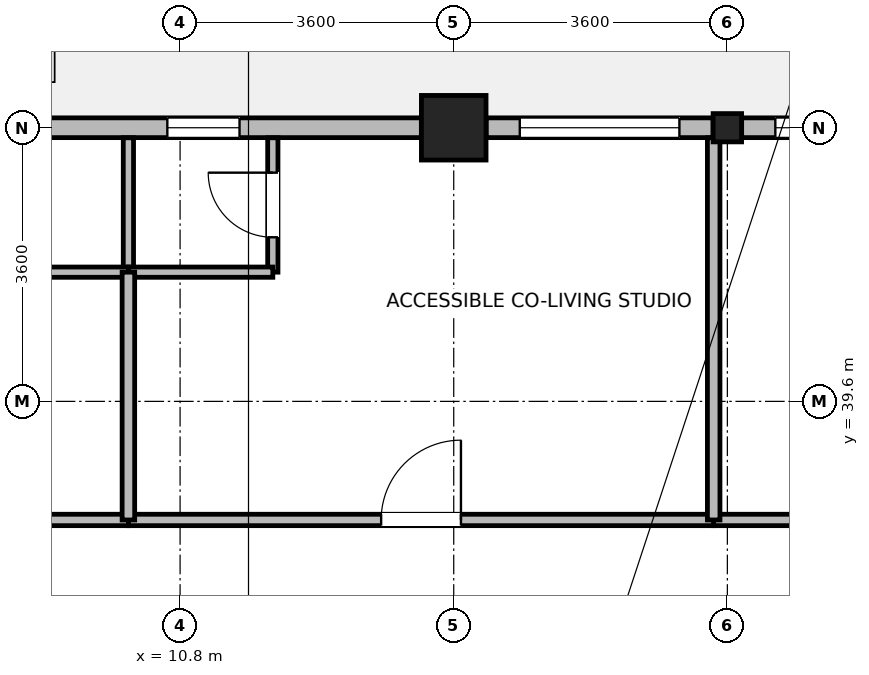
"""IFC4 building model, lengths in metres.
Left out: names, types, materials, properties, quantities, classifications, styles, units other than length and angle.
Written with IfcOpenShell. Run it as: python <this file> out.ifc"""

import sys

from ifc_helpers import new_model, si_unit, direction, frame, frame_2d, origin, origin_2d, place, context, subcontext, project, spatial, rectangle, i_section, extrude, source, transform, mapped, element, fill, save


model = new_model("IFC4")
c1 = context("Model", 3, precision=1e-05, world=origin(), true_north=direction((0.0, 1.0)))
c2 = subcontext(c1, "Body", "Model", "MODEL_VIEW")
j1 = project(units=[si_unit("LENGTHUNIT", "METRE"), si_unit("PLANEANGLEUNIT", "RADIAN")], contexts=[c1])
p1 = place(None, origin())
s1 = spatial("IfcSite", under=j1, at=p1, CompositionType="ELEMENT")
p2 = place(p1, origin())
s2 = spatial("IfcBuilding", under=s1, at=p2, CompositionType="ELEMENT")
p3 = place(p2, frame((0.0, 0.0, 272.1)))
s3 = spatial("IfcBuildingStorey", under=s2, at=p3, CompositionType="ELEMENT", Elevation=272.1)
m1 = source(origin(), c2, "Body", "SweptSolid", [
    extrude(rectangle(XDim=0.85, YDim=0.85, at=origin_2d()), origin(), (0.0, 0.0, 1.0), 3.7),
])
p4 = place(p3, frame((14.4, 43.2, 0.0), z_axis=(0.0, 0.0, 1.0), x_axis=(1.0, 0.0, 0.0)))
e1 = element("IfcColumn", 1, at=p4, inside=s3, PredefinedType="COLUMN", context=c2, shape_type="MappedRepresentation", body=[
    mapped(m1, transform((0.0, 0.0, 0.0), x_axis=(1.0, 0.0, 0.0), y_axis=(0.0, 1.0, 0.0), z_axis=(0.0, 0.0, 1.0), scale=1.0)),
])
m2 = source(origin(), c2, "Body", "SweptSolid", [
    extrude(i_section(OverallWidth=0.374, OverallDepth=0.372, WebThickness=0.015, FlangeThickness=0.026, FilletRadius=0.015, at=origin_2d()), origin(), (0.0, 0.0, 1.0), 3.7),
])
p5 = place(p3, frame((18.0, 43.2, 0.0), z_axis=(0.0, 0.0, 1.0), x_axis=(1.0, 0.0, 0.0)))
e2 = element("IfcColumn", 2, at=p5, inside=s3, PredefinedType="COLUMN", context=c2, shape_type="MappedRepresentation", body=[
    mapped(m2, transform((0.0, 0.0, 0.0), x_axis=(1.0, 0.0, 0.0), y_axis=(0.0, 1.0, 0.0), z_axis=(0.0, 0.0, 1.0), scale=1.0)),
])
p6 = place(p3, frame((18.188, 43.2, 0.0), z_axis=(0.0, 0.0, 1.0), x_axis=(1.0, 0.0, 0.0)))
e3 = element("IfcWall", 3, at=p6, inside=s3, PredefinedType="STANDARD", context=c2, shape_type="SweptSolid", body=[
    extrude(rectangle(XDim=2.986, YDim=0.26, at=frame_2d((1.493, 0.0))), origin(), (0.0, 0.0, 1.0), 3.055),
])
p7 = place(p6, frame((0.443, 0.0, 0.85)))
e4 = element("IfcOpeningElement", 4, at=p7, cuts=e3, PredefinedType="OPENING", context=c2, shape_type="SweptSolid", body=[
    extrude(rectangle(XDim=2.1, YDim=1.95, at=frame_2d((1.05, 0.975))), frame((0.0, 0.14, 0.0), z_axis=(0.0, -1.0, 0.0), x_axis=(1.0, 0.0, 0.0)), (0.0, 0.0, 1.0), 0.28),
])
p8 = place(p3, frame((14.826, 43.2, 0.0), z_axis=(0.0, 0.0, 1.0), x_axis=(1.0, 0.0, 0.0)))
e5 = element("IfcWall", 5, at=p8, inside=s3, PredefinedType="STANDARD", context=c2, shape_type="SweptSolid", body=[
    extrude(rectangle(XDim=2.986, YDim=0.26, at=frame_2d((1.493, 0.0))), origin(), (0.0, 0.0, 1.0), 3.055),
])
p9 = place(p8, frame((0.443, 0.0, 0.85)))
e6 = element("IfcOpeningElement", 6, at=p9, cuts=e5, PredefinedType="OPENING", context=c2, shape_type="SweptSolid", body=[
    extrude(rectangle(XDim=2.1, YDim=1.95, at=frame_2d((1.05, 0.975))), frame((0.0, 0.14, 0.0), z_axis=(0.0, -1.0, 0.0), x_axis=(1.0, 0.0, 0.0)), (0.0, 0.0, 1.0), 0.28),
])
p10 = place(p3, frame((3.735, 43.2, 0.0), z_axis=(0.0, 0.0, 1.0), x_axis=(1.0, 0.0, 0.0)))
e7 = element("IfcWall", 7, at=p10, inside=s3, PredefinedType="STANDARD", context=c2, shape_type="SweptSolid", body=[
    extrude(rectangle(XDim=10.239, YDim=0.26, at=frame_2d((5.12, 0.0))), origin(), (0.0, 0.0, 1.0), 3.455),
])
p11 = place(p10, frame((0.656, 0.0, 0.85)))
e8 = element("IfcOpeningElement", 8, at=p11, cuts=e7, PredefinedType="OPENING", context=c2, shape_type="SweptSolid", body=[
    extrude(rectangle(XDim=2.1, YDim=1.95, at=frame_2d((1.05, 0.975))), frame((0.0, 0.14, 0.0), z_axis=(0.0, -1.0, 0.0), x_axis=(1.0, 0.0, 0.0)), (0.0, 0.0, 1.0), 0.28),
])
p12 = place(p10, frame((6.897, 0.0, 0.85)))
e9 = element("IfcOpeningElement", 9, at=p12, cuts=e7, PredefinedType="OPENING", context=c2, shape_type="SweptSolid", body=[
    extrude(rectangle(XDim=0.95, YDim=1.75, at=frame_2d((0.475, 0.875))), frame((0.0, 0.14, 0.0), z_axis=(0.0, -1.0, 0.0), x_axis=(1.0, 0.0, 0.0)), (0.0, 0.0, 1.0), 0.28),
])
p13 = place(p3, frame((10.12, 41.3, 0.0), z_axis=(0.0, 0.0, 1.0), x_axis=(0.0, 1.0, 0.0)))
e10 = element("IfcWall", 10, at=p13, inside=s3, PredefinedType="PARTITIONING", context=c2, shape_type="SweptSolid", body=[
    extrude(rectangle(XDim=1.768, YDim=0.135, at=frame_2d((0.884, 0.0))), origin(), (0.0, 0.0, 1.0), 3.455),
])
p14 = place(p3, frame((12.02, 41.3, 0.0), z_axis=(0.0, 0.0, 1.0), x_axis=(0.0, 1.0, 0.0)))
e11 = element("IfcWall", 11, at=p14, inside=s3, PredefinedType="PARTITIONING", context=c2, shape_type="SweptSolid", body=[
    extrude(rectangle(XDim=1.768, YDim=0.135, at=frame_2d((0.884, 0.0))), origin(), (0.0, 0.0, 1.0), 3.455),
])
p15 = place(p14, frame((0.459, 0.0, 0.0)))
e12 = element("IfcOpeningElement", 12, at=p15, cuts=e11, PredefinedType="OPENING", context=c2, shape_type="SweptSolid", body=[
    extrude(rectangle(XDim=0.85, YDim=2.04, at=frame_2d((0.425, 1.02))), frame((0.0, 0.078, 0.0), z_axis=(0.0, -1.0, 0.0), x_axis=(1.0, 0.0, 0.0)), (0.0, 0.0, 1.0), 0.155),
])
p16 = place(p3, frame((10.12, 41.3, 0.0), z_axis=(0.0, 0.0, 1.0), x_axis=(1.0, 0.0, 0.0)))
e13 = element("IfcWall", 13, at=p16, inside=s3, PredefinedType="PARTITIONING", context=c2, shape_type="SweptSolid", body=[
    extrude(rectangle(XDim=1.9, YDim=0.135, at=frame_2d((0.95, 0.0))), origin(), (0.0, 0.0, 1.0), 3.455),
])
p17 = place(p3, frame((8.22, 41.3, 0.0), z_axis=(0.0, 0.0, 1.0), x_axis=(1.0, 0.0, 0.0)))
e14 = element("IfcWall", 14, at=p17, inside=s3, PredefinedType="PARTITIONING", context=c2, shape_type="SweptSolid", body=[
    extrude(rectangle(XDim=1.9, YDim=0.135, at=frame_2d((0.95, 0.0))), origin(), (0.0, 0.0, 1.0), 3.455),
])
p18 = place(p3, frame((10.12, 38.04, 0.0), z_axis=(0.0, 0.0, 1.0), x_axis=(1.0, 0.0, 0.0)))
e15 = element("IfcWall", 15, at=p18, inside=s3, PredefinedType="PARTITIONING", context=c2, shape_type="SweptSolid", body=[
    extrude(rectangle(XDim=7.7, YDim=0.15, at=frame_2d((3.85, 0.0))), origin(), (0.0, 0.0, 1.0), 3.455),
])
p19 = place(p18, frame((3.325, 0.0, 0.0)))
e16 = element("IfcOpeningElement", 16, at=p19, cuts=e15, PredefinedType="OPENING", context=c2, shape_type="SweptSolid", body=[
    extrude(rectangle(XDim=1.05, YDim=2.12, at=frame_2d((0.525, 1.06))), frame((0.0, 0.085, 0.0), z_axis=(0.0, -1.0, 0.0), x_axis=(1.0, 0.0, 0.0)), (0.0, 0.0, 1.0), 0.17),
])
p20 = place(p3, frame((17.82, 38.04, 0.0), z_axis=(0.0, 0.0, 1.0), x_axis=(1.0, 0.0, 0.0)))
e17 = element("IfcWall", 17, at=p20, inside=s3, PredefinedType="PARTITIONING", context=c2, shape_type="SweptSolid", body=[
    extrude(rectangle(XDim=7.14, YDim=0.15, at=frame_2d((3.57, 0.0))), origin(), (0.0, 0.0, 1.0), 3.455),
])
p21 = place(p20, frame((2.92, 0.0, 0.0)))
e18 = element("IfcOpeningElement", 18, at=p21, cuts=e17, PredefinedType="OPENING", context=c2, shape_type="SweptSolid", body=[
    extrude(rectangle(XDim=1.3, YDim=2.12, at=frame_2d((0.65, 1.06))), frame((0.0, 0.085, 0.0), z_axis=(0.0, -1.0, 0.0), x_axis=(1.0, 0.0, 0.0)), (0.0, 0.0, 1.0), 0.17),
])
p22 = place(p3, frame((3.732, 38.04, 0.0), z_axis=(0.0, 0.0, 1.0), x_axis=(1.0, 0.0, 0.0)))
e19 = element("IfcWall", 19, at=p22, inside=s3, PredefinedType="PARTITIONING", context=c2, shape_type="SweptSolid", body=[
    extrude(rectangle(XDim=6.388, YDim=0.15, at=frame_2d((3.194, 0.0))), origin(), (0.0, 0.0, 1.0), 3.455),
])
p23 = place(p22, frame((2.719, 0.0, 0.0)))
e20 = element("IfcOpeningElement", 20, at=p23, cuts=e19, PredefinedType="OPENING", context=c2, shape_type="SweptSolid", body=[
    extrude(rectangle(XDim=0.95, YDim=2.1, at=frame_2d((0.475, 1.05))), frame((0.0, 0.085, 0.0), z_axis=(0.0, -1.0, 0.0), x_axis=(1.0, 0.0, 0.0)), (0.0, 0.0, 1.0), 0.17),
])
p24 = place(p3, frame((17.82, 38.04, 0.0), z_axis=(0.0, 0.0, 1.0), x_axis=(0.0, 1.0, 0.0)))
e21 = element("IfcWall", 21, at=p24, inside=s3, PredefinedType="PARTITIONING", context=c2, shape_type="SweptSolid", body=[
    extrude(rectangle(XDim=5.028, YDim=0.165, at=frame_2d((2.514, 0.0))), origin(), (0.0, 0.0, 1.0), 3.215),
])
p25 = place(p3, frame((10.12, 38.04, 0.0), z_axis=(0.0, 0.0, 1.0), x_axis=(0.0, 1.0, 0.0)))
e22 = element("IfcWall", 22, at=p25, inside=s3, PredefinedType="PARTITIONING", context=c2, shape_type="SweptSolid", body=[
    extrude(rectangle(XDim=3.26, YDim=0.165, at=frame_2d((1.63, 0.0))), origin(), (0.0, 0.0, 1.0), 3.455),
])
p26 = place(p7, origin())
e23 = element("IfcWindow", 23, at=p26, inside=s3, PartitioningType="SINGLE_PANEL", PredefinedType="WINDOW", context=c2, shape_type="SweptSolid", body=[
    extrude(rectangle(XDim=2.1, YDim=1.95, at=frame_2d((1.05, 0.975))), frame((0.0, 0.03, 0.0), z_axis=(0.0, -1.0, 0.0), x_axis=(1.0, 0.0, 0.0)), (0.0, 0.0, 1.0), 0.06),
])
fill(e4, e23)
p27 = place(p9, origin())
e24 = element("IfcWindow", 24, at=p27, inside=s3, PartitioningType="SINGLE_PANEL", PredefinedType="WINDOW", context=c2, shape_type="SweptSolid", body=[
    extrude(rectangle(XDim=2.1, YDim=1.95, at=frame_2d((1.05, 0.975))), frame((0.0, 0.03, 0.0), z_axis=(0.0, -1.0, 0.0), x_axis=(1.0, 0.0, 0.0)), (0.0, 0.0, 1.0), 0.06),
])
fill(e6, e24)
p28 = place(p12, origin())
e25 = element("IfcWindow", 25, at=p28, inside=s3, PartitioningType="SINGLE_PANEL", PredefinedType="WINDOW", context=c2, shape_type="SweptSolid", body=[
    extrude(rectangle(XDim=0.95, YDim=1.75, at=frame_2d((0.475, 0.875))), frame((0.0, 0.03, 0.0), z_axis=(0.0, -1.0, 0.0), x_axis=(1.0, 0.0, 0.0)), (0.0, 0.0, 1.0), 0.06),
])
fill(e9, e25)
p29 = place(p15, origin())
e26 = element("IfcDoor", 26, at=p29, inside=s3, OperationType="SINGLE_SWING_RIGHT", PredefinedType="DOOR", context=c2, shape_type="SweptSolid", body=[
    extrude(rectangle(XDim=0.85, YDim=2.04, at=frame_2d((0.425, 1.02))), frame((0.0, 0.025, 0.0), z_axis=(0.0, -1.0, 0.0), x_axis=(1.0, 0.0, 0.0)), (0.0, 0.0, 1.0), 0.05),
])
fill(e12, e26)
p30 = place(p19, origin())
e27 = element("IfcDoor", 27, at=p30, inside=s3, OperationType="SINGLE_SWING_RIGHT", PredefinedType="DOOR", context=c2, shape_type="SweptSolid", body=[
    extrude(rectangle(XDim=1.05, YDim=2.12, at=frame_2d((0.525, 1.06))), frame((0.0, 0.025, 0.0), z_axis=(0.0, -1.0, 0.0), x_axis=(1.0, 0.0, 0.0)), (0.0, 0.0, 1.0), 0.05),
])
fill(e16, e27)
save(model, sys.argv[1])
